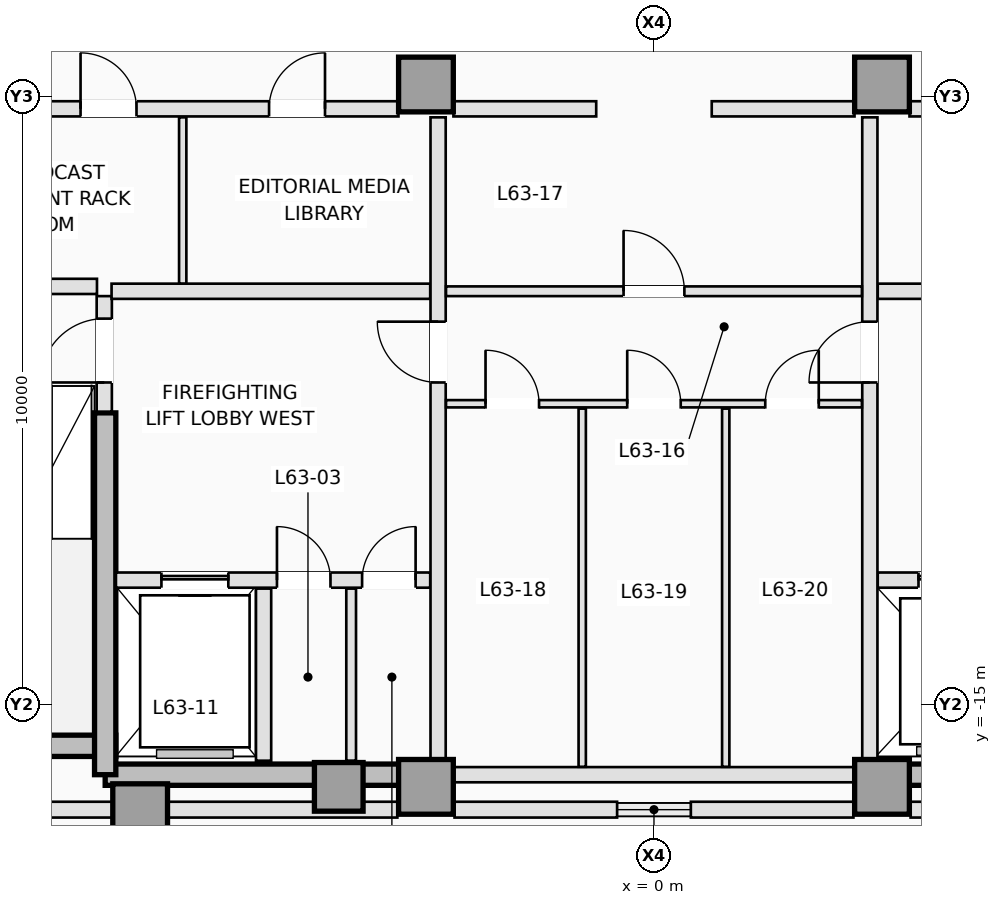
"""IFC4 building model, lengths in metres.
Left out: names, types, materials, properties, quantities, classifications, styles, units other than length and angle.
Written with IfcOpenShell. Run it as: python <this file> out.ifc"""

import sys

from ifc_helpers import new_model, si_unit, direction, frame, frame_2d, origin, origin_2d, place, context, subcontext, project, spatial, rectangle, extrude, element, fill, save


model = new_model("IFC4")
c1 = context("Model", 3, precision=1e-05, world=origin(), true_north=direction((0.0, 1.0)))
c2 = subcontext(c1, "Body", "Model", "MODEL_VIEW")
j1 = project(units=[si_unit("LENGTHUNIT", "METRE"), si_unit("PLANEANGLEUNIT", "RADIAN")], contexts=[c1])
p1 = place(None, origin())
s1 = spatial("IfcSite", under=j1, at=p1, CompositionType="ELEMENT")
p2 = place(p1, origin())
s2 = spatial("IfcBuilding", under=s1, at=p2, CompositionType="ELEMENT")
p3 = place(p2, frame((0.0, 0.0, 228.9)))
s3 = spatial("IfcBuildingStorey", under=s2, at=p3, CompositionType="ELEMENT", Elevation=228.9)
p4 = place(p3, frame((-12.55, -15.675, 0.0), z_axis=(0.0, 0.0, 1.0), x_axis=(1.0, 0.0, 0.0)))
e1 = element("IfcWall", 1, at=p4, inside=s3, PredefinedType="SHEAR", context=c2, shape_type="SweptSolid", body=[
    extrude(rectangle(XDim=3.7, YDim=0.35, at=frame_2d((1.85, 0.0))), origin(), (0.0, 0.0, 1.0), 3.5),
])
for number, where, z_axis, x_axis in (
    (2, (-9.025, -16.15, 0.0), (0.0, 0.0, 1.0), (1.0, 0.0, 0.0)),
    (3, (3.75, -16.15, 0.0), (0.0, 0.0, 1.0), (1.0, 0.0, 0.0)),
):
    element("IfcWall", number, at=place(p3, frame(where, z_axis=z_axis, x_axis=x_axis)), inside=s3, PredefinedType="SHEAR", context=c2, shape_type="SweptSolid", body=[
        extrude(rectangle(XDim=5.275, YDim=0.35, at=frame_2d((2.637, 0.0))), origin(), (0.0, 0.0, 1.0), 3.5),
    ])
p5 = place(p3, frame((-9.025, -16.15, 0.0), z_axis=(0.0, 0.0, 1.0), x_axis=(0.0, 1.0, 0.0)))
e4 = element("IfcWall", 4, at=p5, inside=s3, PredefinedType="SHEAR", context=c2, shape_type="SweptSolid", body=[
    extrude(rectangle(XDim=5.95, YDim=0.35, at=frame_2d((2.975, 0.0))), origin(), (0.0, 0.0, 1.0), 3.5),
])
for number, where, z_axis, x_axis in (
    (5, (-8.45, -16.75, 0.0), (0.0, 0.0, 1.0), (1.0, 0.0, 0.0)),
    (6, (-3.75, -16.35, 0.0), (0.0, 0.0, 1.0), (1.0, 0.0, 0.0)),
    (7, (3.75, -16.35, 0.0), (0.0, 0.0, 1.0), (1.0, 0.0, 0.0)),
    (8, (-3.75, -4.8, 0.0), (0.0, 0.0, 1.0), (1.0, 0.0, 0.0)),
    (9, (3.75, -4.8, 0.0), (0.0, 0.0, 1.0), (1.0, 0.0, 0.0)),
):
    element("IfcColumn", number, at=place(p3, frame(where, z_axis=z_axis, x_axis=x_axis)), inside=s3, PredefinedType="COLUMN", context=c2, shape_type="SweptSolid", body=[
        extrude(rectangle(XDim=0.9, YDim=0.9, at=origin_2d()), origin(), (0.0, 0.0, 1.0), 3.5),
    ])
p6 = place(p3, frame((-5.184, -16.35, 0.0), z_axis=(0.0, 0.0, 1.0), x_axis=(0.0, 1.0, 0.0)))
e10 = element("IfcColumn", 10, at=p6, inside=s3, PredefinedType="COLUMN", context=c2, shape_type="SweptSolid", body=[
    extrude(rectangle(XDim=0.8, YDim=0.8, at=origin_2d()), origin(), (0.0, 0.0, 1.0), 3.5),
])
for number, where, z_axis, x_axis in (
    (11, (15.493, -16.725, 0.0), (0.0, 0.0, 1.0), (-1.0, 0.0, 0.0)),
    (12, (-4.22, -16.725, 0.0), (0.0, 0.0, 1.0), (-1.0, 0.0, 0.0)),
):
    element("IfcWall", number, at=place(p3, frame(where, z_axis=z_axis, x_axis=x_axis)), inside=s3, PredefinedType="STANDARD", context=c2, shape_type="SweptSolid", body=[
        extrude(rectangle(XDim=11.273, YDim=0.26, at=frame_2d((5.636, 0.0))), origin(), (0.0, 0.0, 1.0), 2.79),
    ])
for number, where, z_axis, x_axis in (
    (13, (3.28, -16.725, 0.0), (0.0, 0.0, 1.0), (-1.0, 0.0, 0.0)),
    (14, (-0.606, -16.725, 0.0), (0.0, 0.0, 1.0), (-1.0, 0.0, 0.0)),
):
    element("IfcWall", number, at=place(p3, frame(where, z_axis=z_axis, x_axis=x_axis)), inside=s3, PredefinedType="STANDARD", context=c2, shape_type="SweptSolid", body=[
        extrude(rectangle(XDim=2.674, YDim=0.26, at=frame_2d((1.337, 0.0))), origin(), (0.0, 0.0, 1.0), 3.25),
    ])
p7 = place(p3, frame((-9.04, -10.18, 0.0), z_axis=(0.0, 0.0, 1.0), x_axis=(0.0, 1.0, 0.0)))
e15 = element("IfcWall", 15, at=p7, inside=s3, PredefinedType="PARTITIONING", context=c2, shape_type="SweptSolid", body=[
    extrude(rectangle(XDim=1.9, YDim=0.25, at=frame_2d((0.95, 0.0))), origin(), (0.0, 0.0, 1.0), 3.25),
])
p8 = place(p7, frame((0.48, 0.0, 0.0)))
e16 = element("IfcOpeningElement", 16, at=p8, cuts=e15, PredefinedType="OPENING", context=c2, shape_type="SweptSolid", body=[
    extrude(rectangle(XDim=1.05, YDim=2.15, at=frame_2d((0.525, 1.075))), frame((0.0, 0.135, 0.0), z_axis=(0.0, -1.0, 0.0), x_axis=(1.0, 0.0, 0.0)), (0.0, 0.0, 1.0), 0.27),
])
p9 = place(p3, frame((-12.38, -8.12, 0.0), z_axis=(0.0, 0.0, 1.0), x_axis=(1.0, 0.0, 0.0)))
e17 = element("IfcWall", 17, at=p9, inside=s3, PredefinedType="PARTITIONING", context=c2, shape_type="SweptSolid", body=[
    extrude(rectangle(XDim=3.22, YDim=0.25, at=frame_2d((1.61, 0.0))), origin(), (0.0, 0.0, 1.0), 3.25),
])
p10 = place(p3, frame((-8.848, -12.95, 0.0), z_axis=(0.0, 0.0, 1.0), x_axis=(1.0, 0.0, 0.0)))
e18 = element("IfcWall", 18, at=p10, inside=s3, PredefinedType="PARTITIONING", context=c2, shape_type="SweptSolid", body=[
    extrude(rectangle(XDim=5.168, YDim=0.25, at=frame_2d((2.584, 0.0))), origin(), (0.0, 0.0, 1.0), 3.25),
])
p11 = place(p10, frame((0.748, 0.0, 0.0)))
e19 = element("IfcOpeningElement", 19, at=p11, cuts=e18, PredefinedType="OPENING", context=c2, shape_type="SweptSolid", body=[
    extrude(rectangle(XDim=1.1, YDim=2.15, at=frame_2d((0.55, 1.075))), frame((0.0, 0.135, 0.0), z_axis=(0.0, -1.0, 0.0), x_axis=(1.0, 0.0, 0.0)), (0.0, 0.0, 1.0), 0.27),
])
p12 = place(p10, frame((2.648, 0.0, 0.0)))
e20 = element("IfcOpeningElement", 20, at=p12, cuts=e18, PredefinedType="OPENING", context=c2, shape_type="SweptSolid", body=[
    extrude(rectangle(XDim=0.88, YDim=2.1, at=frame_2d((0.44, 1.05))), frame((0.0, 0.135, 0.0), z_axis=(0.0, -1.0, 0.0), x_axis=(1.0, 0.0, 0.0)), (0.0, 0.0, 1.0), 0.27),
])
p13 = place(p10, frame((4.048, 0.0, 0.0)))
e21 = element("IfcOpeningElement", 21, at=p13, cuts=e18, PredefinedType="OPENING", context=c2, shape_type="SweptSolid", body=[
    extrude(rectangle(XDim=0.88, YDim=2.1, at=frame_2d((0.44, 1.05))), frame((0.0, 0.135, 0.0), z_axis=(0.0, -1.0, 0.0), x_axis=(1.0, 0.0, 0.0)), (0.0, 0.0, 1.0), 0.27),
])
p14 = place(p3, frame((3.68, -12.95, 0.0), z_axis=(0.0, 0.0, 1.0), x_axis=(1.0, 0.0, 0.0)))
e22 = element("IfcWall", 22, at=p14, inside=s3, PredefinedType="PARTITIONING", context=c2, shape_type="SweptSolid", body=[
    extrude(rectangle(XDim=5.168, YDim=0.25, at=frame_2d((2.584, 0.0))), origin(), (0.0, 0.0, 1.0), 3.25),
])
p15 = place(p14, frame((3.32, 0.0, 0.0)))
e23 = element("IfcOpeningElement", 23, at=p15, cuts=e22, PredefinedType="OPENING", context=c2, shape_type="SweptSolid", body=[
    extrude(rectangle(XDim=1.1, YDim=2.15, at=frame_2d((0.55, 1.075))), frame((0.0, 0.135, 0.0), z_axis=(0.0, -1.0, 0.0), x_axis=(1.0, 0.0, 0.0)), (0.0, 0.0, 1.0), 0.27),
])
p16 = place(p14, frame((0.67, 0.0, 0.0)))
e24 = element("IfcOpeningElement", 24, at=p16, cuts=e22, PredefinedType="OPENING", context=c2, shape_type="SweptSolid", body=[
    extrude(rectangle(XDim=1.2, YDim=2.15, at=frame_2d((0.6, 1.075))), frame((0.0, 0.135, 0.0), z_axis=(0.0, -1.0, 0.0), x_axis=(1.0, 0.0, 0.0)), (0.0, 0.0, 1.0), 0.27),
])
p17 = place(p3, frame((-6.42, -15.92, 0.0), z_axis=(0.0, 0.0, 1.0), x_axis=(0.0, 1.0, 0.0)))
e25 = element("IfcWall", 25, at=p17, inside=s3, PredefinedType="PARTITIONING", context=c2, shape_type="SweptSolid", body=[
    extrude(rectangle(XDim=2.83, YDim=0.25, at=frame_2d((1.415, 0.0))), origin(), (0.0, 0.0, 1.0), 3.25),
])
p18 = place(p3, frame((-4.98, -15.92, 0.0), z_axis=(0.0, 0.0, 1.0), x_axis=(0.0, 1.0, 0.0)))
e26 = element("IfcWall", 26, at=p18, inside=s3, PredefinedType="PARTITIONING", context=c2, shape_type="SweptSolid", body=[
    extrude(rectangle(XDim=2.83, YDim=0.16, at=frame_2d((1.415, 0.0))), origin(), (0.0, 0.0, 1.0), 3.25),
])
for number, where, z_axis, x_axis in (
    (27, (-8.92, -8.2, 0.0), (0.0, 0.0, 1.0), (1.0, 0.0, 0.0)),
    (28, (3.68, -8.2, 0.0), (0.0, 0.0, 1.0), (1.0, 0.0, 0.0)),
):
    element("IfcWall", number, at=place(p3, frame(where, z_axis=z_axis, x_axis=x_axis)), inside=s3, PredefinedType="PARTITIONING", context=c2, shape_type="SweptSolid", body=[
        extrude(rectangle(XDim=5.24, YDim=0.25, at=frame_2d((2.62, 0.0))), origin(), (0.0, 0.0, 1.0), 3.25),
    ])
p19 = place(p3, frame((-3.55, -15.898, 0.0), z_axis=(0.0, 0.0, 1.0), x_axis=(0.0, 1.0, 0.0)))
e29 = element("IfcWall", 29, at=p19, inside=s3, PredefinedType="PARTITIONING", context=c2, shape_type="SweptSolid", body=[
    extrude(rectangle(XDim=10.558, YDim=0.25, at=frame_2d((5.279, 0.0))), origin(), (0.0, 0.0, 1.0), 3.25),
])
p20 = place(p19, frame((6.198, 0.0, 0.0)))
e30 = element("IfcOpeningElement", 30, at=p20, cuts=e29, PredefinedType="OPENING", context=c2, shape_type="SweptSolid", body=[
    extrude(rectangle(XDim=1.0, YDim=2.15, at=frame_2d((0.5, 1.075))), frame((0.0, 0.135, 0.0), z_axis=(0.0, -1.0, 0.0), x_axis=(1.0, 0.0, 0.0)), (0.0, 0.0, 1.0), 0.27),
])
p21 = place(p3, frame((3.55, -15.898, 0.0), z_axis=(0.0, 0.0, 1.0), x_axis=(0.0, 1.0, 0.0)))
e31 = element("IfcWall", 31, at=p21, inside=s3, PredefinedType="PARTITIONING", context=c2, shape_type="SweptSolid", body=[
    extrude(rectangle(XDim=10.558, YDim=0.25, at=frame_2d((5.279, 0.0))), origin(), (0.0, 0.0, 1.0), 3.25),
])
p22 = place(p21, frame((6.198, 0.0, 0.0)))
e32 = element("IfcOpeningElement", 32, at=p22, cuts=e31, PredefinedType="OPENING", context=c2, shape_type="SweptSolid", body=[
    extrude(rectangle(XDim=1.0, YDim=2.15, at=frame_2d((0.5, 1.075))), frame((0.0, 0.135, 0.0), z_axis=(0.0, -1.0, 0.0), x_axis=(1.0, 0.0, 0.0)), (0.0, 0.0, 1.0), 0.27),
])
p23 = place(p3, frame((-12.48, -5.2, 0.0), z_axis=(0.0, 0.0, 1.0), x_axis=(1.0, 0.0, 0.0)))
e33 = element("IfcWall", 33, at=p23, inside=s3, PredefinedType="PARTITIONING", context=c2, shape_type="SweptSolid", body=[
    extrude(rectangle(XDim=8.278, YDim=0.25, at=frame_2d((4.139, 0.0))), origin(), (0.0, 0.0, 1.0), 3.25),
])
p24 = place(p23, frame((3.05, 0.0, 0.0)))
e34 = element("IfcOpeningElement", 34, at=p24, cuts=e33, PredefinedType="OPENING", context=c2, shape_type="SweptSolid", body=[
    extrude(rectangle(XDim=0.92, YDim=2.12, at=frame_2d((0.46, 1.06))), frame((0.0, 0.135, 0.0), z_axis=(0.0, -1.0, 0.0), x_axis=(1.0, 0.0, 0.0)), (0.0, 0.0, 1.0), 0.27),
])
p25 = place(p23, frame((6.15, 0.0, 0.0)))
e35 = element("IfcOpeningElement", 35, at=p25, cuts=e33, PredefinedType="OPENING", context=c2, shape_type="SweptSolid", body=[
    extrude(rectangle(XDim=0.92, YDim=2.12, at=frame_2d((0.46, 1.06))), frame((0.0, 0.135, 0.0), z_axis=(0.0, -1.0, 0.0), x_axis=(1.0, 0.0, 0.0)), (0.0, 0.0, 1.0), 0.27),
])
p26 = place(p3, frame((4.202, -5.2, 0.0), z_axis=(0.0, 0.0, 1.0), x_axis=(1.0, 0.0, 0.0)))
e36 = element("IfcWall", 36, at=p26, inside=s3, PredefinedType="PARTITIONING", context=c2, shape_type="SweptSolid", body=[
    extrude(rectangle(XDim=8.278, YDim=0.25, at=frame_2d((4.139, 0.0))), origin(), (0.0, 0.0, 1.0), 3.25),
])
p27 = place(p26, frame((0.748, 0.0, 0.0)))
e37 = element("IfcOpeningElement", 37, at=p27, cuts=e36, PredefinedType="OPENING", context=c2, shape_type="SweptSolid", body=[
    extrude(rectangle(XDim=1.0, YDim=2.15, at=frame_2d((0.5, 1.075))), frame((0.0, 0.135, 0.0), z_axis=(0.0, -1.0, 0.0), x_axis=(1.0, 0.0, 0.0)), (0.0, 0.0, 1.0), 0.27),
])
p28 = place(p26, frame((2.698, 0.0, 0.0)))
e38 = element("IfcOpeningElement", 38, at=p28, cuts=e36, PredefinedType="OPENING", context=c2, shape_type="SweptSolid", body=[
    extrude(rectangle(XDim=1.0, YDim=2.15, at=frame_2d((0.5, 1.075))), frame((0.0, 0.135, 0.0), z_axis=(0.0, -1.0, 0.0), x_axis=(1.0, 0.0, 0.0)), (0.0, 0.0, 1.0), 0.27),
])
p29 = place(p26, frame((4.648, 0.0, 0.0)))
e39 = element("IfcOpeningElement", 39, at=p29, cuts=e36, PredefinedType="OPENING", context=c2, shape_type="SweptSolid", body=[
    extrude(rectangle(XDim=1.0, YDim=2.15, at=frame_2d((0.5, 1.075))), frame((0.0, 0.135, 0.0), z_axis=(0.0, -1.0, 0.0), x_axis=(1.0, 0.0, 0.0)), (0.0, 0.0, 1.0), 0.27),
])
p30 = place(p26, frame((6.598, 0.0, 0.0)))
e40 = element("IfcOpeningElement", 40, at=p30, cuts=e36, PredefinedType="OPENING", context=c2, shape_type="SweptSolid", body=[
    extrude(rectangle(XDim=1.0, YDim=2.15, at=frame_2d((0.5, 1.075))), frame((0.0, 0.135, 0.0), z_axis=(0.0, -1.0, 0.0), x_axis=(1.0, 0.0, 0.0)), (0.0, 0.0, 1.0), 0.27),
])
for number, where, z_axis, x_axis in (
    (41, (-3.298, -5.2, 0.0), (0.0, 0.0, 1.0), (1.0, 0.0, 0.0)),
    (42, (0.95, -5.2, 0.0), (0.0, 0.0, 1.0), (1.0, 0.0, 0.0)),
):
    element("IfcWall", number, at=place(p3, frame(where, z_axis=z_axis, x_axis=x_axis)), inside=s3, PredefinedType="PARTITIONING", context=c2, shape_type="SweptSolid", body=[
        extrude(rectangle(XDim=2.348, YDim=0.25, at=frame_2d((1.174, 0.0))), origin(), (0.0, 0.0, 1.0), 3.25),
    ])
p31 = place(p3, frame((-7.75, -8.073, 0.0), z_axis=(0.0, 0.0, 1.0), x_axis=(0.0, 1.0, 0.0)))
e43 = element("IfcWall", 43, at=p31, inside=s3, PredefinedType="PARTITIONING", context=c2, shape_type="SweptSolid", body=[
    extrude(rectangle(XDim=2.733, YDim=0.12, at=frame_2d((1.366, 0.0))), origin(), (0.0, 0.0, 1.0), 3.25),
])
p32 = place(p3, frame((-3.298, -16.15, 0.0), z_axis=(0.0, 0.0, 1.0), x_axis=(1.0, 0.0, 0.0)))
e44 = element("IfcWall", 44, at=p32, inside=s3, PredefinedType="PARTITIONING", context=c2, shape_type="SweptSolid", body=[
    extrude(rectangle(XDim=6.596, YDim=0.25, at=frame_2d((3.298, 0.0))), origin(), (0.0, 0.0, 1.0), 2.844),
])
p33 = place(p3, frame((-3.42, -8.2, 0.0), z_axis=(0.0, 0.0, 1.0), x_axis=(1.0, 0.0, 0.0)))
e45 = element("IfcWall", 45, at=p33, inside=s3, PredefinedType="PARTITIONING", context=c2, shape_type="SweptSolid", body=[
    extrude(rectangle(XDim=6.84, YDim=0.16, at=frame_2d((3.42, 0.0))), origin(), (0.0, 0.0, 1.0), 3.25),
])
p34 = place(p33, frame((2.92, 0.0, 0.0)))
e46 = element("IfcOpeningElement", 46, at=p34, cuts=e45, PredefinedType="OPENING", context=c2, shape_type="SweptSolid", body=[
    extrude(rectangle(XDim=1.0, YDim=2.15, at=frame_2d((0.5, 1.075))), frame((0.0, 0.09, 0.0), z_axis=(0.0, -1.0, 0.0), x_axis=(1.0, 0.0, 0.0)), (0.0, 0.0, 1.0), 0.18),
])
p35 = place(p3, frame((-3.42, -10.05, 0.0), z_axis=(0.0, 0.0, 1.0), x_axis=(1.0, 0.0, 0.0)))
e47 = element("IfcWall", 47, at=p35, inside=s3, PredefinedType="PARTITIONING", context=c2, shape_type="SweptSolid", body=[
    extrude(rectangle(XDim=6.84, YDim=0.12, at=frame_2d((3.42, 0.0))), origin(), (0.0, 0.0, 1.0), 3.25),
])
p36 = place(p35, frame((0.65, 0.0, 0.0)))
e48 = element("IfcOpeningElement", 48, at=p36, cuts=e47, PredefinedType="OPENING", context=c2, shape_type="SweptSolid", body=[
    extrude(rectangle(XDim=0.88, YDim=2.12, at=frame_2d((0.44, 1.06))), frame((0.0, 0.07, 0.0), z_axis=(0.0, -1.0, 0.0), x_axis=(1.0, 0.0, 0.0)), (0.0, 0.0, 1.0), 0.14),
])
p37 = place(p35, frame((2.98, 0.0, 0.0)))
e49 = element("IfcOpeningElement", 49, at=p37, cuts=e47, PredefinedType="OPENING", context=c2, shape_type="SweptSolid", body=[
    extrude(rectangle(XDim=0.88, YDim=2.12, at=frame_2d((0.44, 1.06))), frame((0.0, 0.07, 0.0), z_axis=(0.0, -1.0, 0.0), x_axis=(1.0, 0.0, 0.0)), (0.0, 0.0, 1.0), 0.14),
])
p38 = place(p35, frame((5.25, 0.0, 0.0)))
e50 = element("IfcOpeningElement", 50, at=p38, cuts=e47, PredefinedType="OPENING", context=c2, shape_type="SweptSolid", body=[
    extrude(rectangle(XDim=0.88, YDim=2.12, at=frame_2d((0.44, 1.06))), frame((0.0, 0.07, 0.0), z_axis=(0.0, -1.0, 0.0), x_axis=(1.0, 0.0, 0.0)), (0.0, 0.0, 1.0), 0.14),
])
for number, where, z_axis, x_axis in (
    (51, (-1.18, -16.02, 0.0), (0.0, 0.0, 1.0), (0.0, 1.0, 0.0)),
    (52, (1.18, -16.02, 0.0), (0.0, 0.0, 1.0), (0.0, 1.0, 0.0)),
):
    element("IfcWall", number, at=place(p3, frame(where, z_axis=z_axis, x_axis=x_axis)), inside=s3, PredefinedType="PARTITIONING", context=c2, shape_type="SweptSolid", body=[
        extrude(rectangle(XDim=5.89, YDim=0.12, at=frame_2d((2.945, 0.0))), origin(), (0.0, 0.0, 1.0), 3.25),
    ])
p39 = place(p11, origin())
e53 = element("IfcDoor", 53, at=p39, inside=s3, OperationType="SLIDING_TO_LEFT", PredefinedType="DOOR", context=c2, shape_type="SweptSolid", body=[
    extrude(rectangle(XDim=1.1, YDim=2.15, at=frame_2d((0.55, 1.075))), frame((0.0, 0.025, 0.0), z_axis=(0.0, -1.0, 0.0), x_axis=(1.0, 0.0, 0.0)), (0.0, 0.0, 1.0), 0.05),
])
fill(e19, e53)
p40 = place(p16, origin())
e54 = element("IfcDoor", 54, at=p40, inside=s3, OperationType="SLIDING_TO_LEFT", PredefinedType="DOOR", context=c2, shape_type="SweptSolid", body=[
    extrude(rectangle(XDim=1.2, YDim=2.15, at=frame_2d((0.6, 1.075))), frame((0.0, 0.025, 0.0), z_axis=(0.0, -1.0, 0.0), x_axis=(1.0, 0.0, 0.0)), (0.0, 0.0, 1.0), 0.05),
])
fill(e24, e54)
p41 = place(p8, origin())
e55 = element("IfcDoor", 55, at=p41, inside=s3, OperationType="SINGLE_SWING_LEFT", PredefinedType="DOOR", context=c2, shape_type="SweptSolid", body=[
    extrude(rectangle(XDim=1.05, YDim=2.15, at=frame_2d((0.525, 1.075))), frame((0.0, 0.025, 0.0), z_axis=(0.0, -1.0, 0.0), x_axis=(1.0, 0.0, 0.0)), (0.0, 0.0, 1.0), 0.05),
])
fill(e16, e55)
p42 = place(p12, origin())
e56 = element("IfcDoor", 56, at=p42, inside=s3, OperationType="SINGLE_SWING_LEFT", PredefinedType="TRAPDOOR", context=c2, shape_type="SweptSolid", body=[
    extrude(rectangle(XDim=0.88, YDim=2.1, at=frame_2d((0.44, 1.05))), frame((0.0, 0.025, 0.0), z_axis=(0.0, -1.0, 0.0), x_axis=(1.0, 0.0, 0.0)), (0.0, 0.0, 1.0), 0.05),
])
fill(e20, e56)
p43 = place(p13, origin())
e57 = element("IfcDoor", 57, at=p43, inside=s3, OperationType="SINGLE_SWING_RIGHT", PredefinedType="TRAPDOOR", context=c2, shape_type="SweptSolid", body=[
    extrude(rectangle(XDim=0.88, YDim=2.1, at=frame_2d((0.44, 1.05))), frame((0.0, 0.025, 0.0), z_axis=(0.0, -1.0, 0.0), x_axis=(1.0, 0.0, 0.0)), (0.0, 0.0, 1.0), 0.05),
])
fill(e21, e57)
p44 = place(p20, origin())
e58 = element("IfcDoor", 58, at=p44, inside=s3, OperationType="SINGLE_SWING_RIGHT", PredefinedType="DOOR", context=c2, shape_type="SweptSolid", body=[
    extrude(rectangle(XDim=1.0, YDim=2.15, at=frame_2d((0.5, 1.075))), frame((0.0, 0.025, 0.0), z_axis=(0.0, -1.0, 0.0), x_axis=(1.0, 0.0, 0.0)), (0.0, 0.0, 1.0), 0.05),
])
fill(e30, e58)
p45 = place(p22, origin())
e59 = element("IfcDoor", 59, at=p45, inside=s3, OperationType="SINGLE_SWING_LEFT", PredefinedType="DOOR", context=c2, shape_type="SweptSolid", body=[
    extrude(rectangle(XDim=1.0, YDim=2.15, at=frame_2d((0.5, 1.075))), frame((0.0, 0.025, 0.0), z_axis=(0.0, -1.0, 0.0), x_axis=(1.0, 0.0, 0.0)), (0.0, 0.0, 1.0), 0.05),
])
fill(e32, e59)
p46 = place(p24, origin())
e60 = element("IfcDoor", 60, at=p46, inside=s3, OperationType="SINGLE_SWING_LEFT", PredefinedType="DOOR", context=c2, shape_type="SweptSolid", body=[
    extrude(rectangle(XDim=0.92, YDim=2.12, at=frame_2d((0.46, 1.06))), frame((0.0, 0.025, 0.0), z_axis=(0.0, -1.0, 0.0), x_axis=(1.0, 0.0, 0.0)), (0.0, 0.0, 1.0), 0.05),
])
fill(e34, e60)
p47 = place(p25, origin())
e61 = element("IfcDoor", 61, at=p47, inside=s3, OperationType="SINGLE_SWING_RIGHT", PredefinedType="DOOR", context=c2, shape_type="SweptSolid", body=[
    extrude(rectangle(XDim=0.92, YDim=2.12, at=frame_2d((0.46, 1.06))), frame((0.0, 0.025, 0.0), z_axis=(0.0, -1.0, 0.0), x_axis=(1.0, 0.0, 0.0)), (0.0, 0.0, 1.0), 0.05),
])
fill(e35, e61)
p48 = place(p34, origin())
e62 = element("IfcDoor", 62, at=p48, inside=s3, OperationType="SINGLE_SWING_LEFT", PredefinedType="DOOR", context=c2, shape_type="SweptSolid", body=[
    extrude(rectangle(XDim=1.0, YDim=2.15, at=frame_2d((0.5, 1.075))), frame((0.0, 0.025, 0.0), z_axis=(0.0, -1.0, 0.0), x_axis=(1.0, 0.0, 0.0)), (0.0, 0.0, 1.0), 0.05),
])
fill(e46, e62)
p49 = place(p36, origin())
e63 = element("IfcDoor", 63, at=p49, inside=s3, OperationType="SINGLE_SWING_LEFT", PredefinedType="DOOR", context=c2, shape_type="SweptSolid", body=[
    extrude(rectangle(XDim=0.88, YDim=2.12, at=frame_2d((0.44, 1.06))), frame((0.0, 0.025, 0.0), z_axis=(0.0, -1.0, 0.0), x_axis=(1.0, 0.0, 0.0)), (0.0, 0.0, 1.0), 0.05),
])
fill(e48, e63)
p50 = place(p37, origin())
e64 = element("IfcDoor", 64, at=p50, inside=s3, OperationType="SINGLE_SWING_LEFT", PredefinedType="DOOR", context=c2, shape_type="SweptSolid", body=[
    extrude(rectangle(XDim=0.88, YDim=2.12, at=frame_2d((0.44, 1.06))), frame((0.0, 0.025, 0.0), z_axis=(0.0, -1.0, 0.0), x_axis=(1.0, 0.0, 0.0)), (0.0, 0.0, 1.0), 0.05),
])
fill(e49, e64)
p51 = place(p38, origin())
e65 = element("IfcDoor", 65, at=p51, inside=s3, OperationType="SINGLE_SWING_RIGHT", PredefinedType="DOOR", context=c2, shape_type="SweptSolid", body=[
    extrude(rectangle(XDim=0.88, YDim=2.12, at=frame_2d((0.44, 1.06))), frame((0.0, 0.025, 0.0), z_axis=(0.0, -1.0, 0.0), x_axis=(1.0, 0.0, 0.0)), (0.0, 0.0, 1.0), 0.05),
])
fill(e50, e65)
save(model, sys.argv[1])
